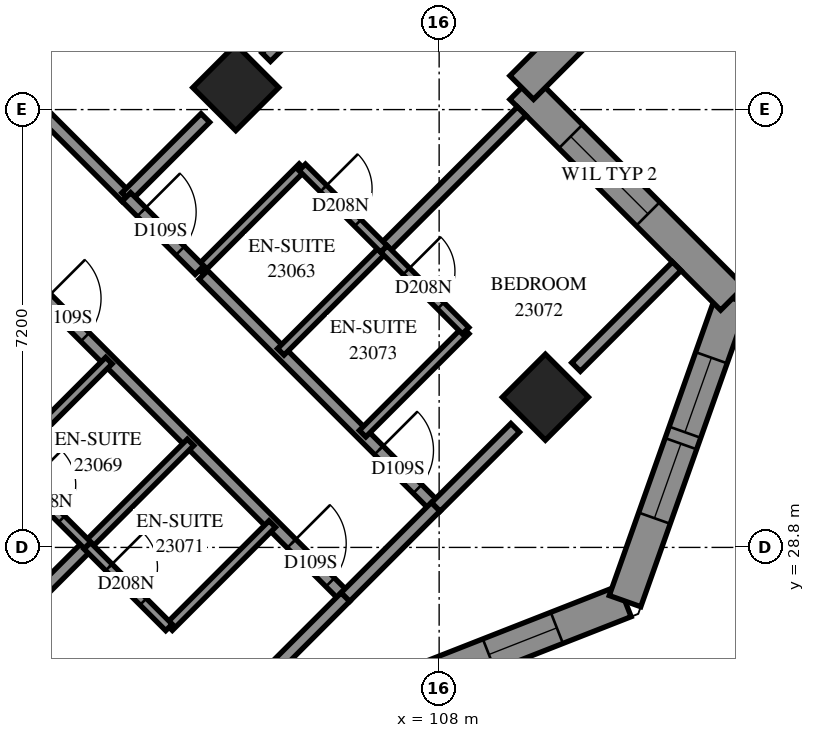
"""IFC4 building model, lengths in metres.
Left out: names, types, materials, properties, quantities, classifications, styles, units other than length and angle.
Written with IfcOpenShell. Run it as: python <this file> out.ifc"""

import sys

from ifc_helpers import new_model, si_unit, direction, frame, frame_2d, origin, origin_2d, place, context, subcontext, project, spatial, polyline, rectangle, outline, extrude, element, fill, save


model = new_model("IFC4")
c1 = context("Model", 3, precision=1e-05, world=origin(), true_north=direction((0.0, 1.0)))
c2 = subcontext(c1, "Body", "Model", "MODEL_VIEW")
j1 = project(units=[si_unit("LENGTHUNIT", "METRE"), si_unit("PLANEANGLEUNIT", "RADIAN")], contexts=[c1])
p1 = place(None, origin())
s1 = spatial("IfcSite", under=j1, at=p1, CompositionType="ELEMENT")
p2 = place(p1, origin())
s2 = spatial("IfcBuilding", under=s1, at=p2, CompositionType="ELEMENT")
p3 = place(p2, frame((0.0, 0.0, 88.0)))
s3 = spatial("IfcBuildingStorey", under=s2, at=p3, CompositionType="ELEMENT", Elevation=88.0)
for number, where, z_axis, x_axis in (
    (1, (104.656, 36.362, 0.0), (0.0, 0.0, 1.0), (0.707, -0.707, 0.0)),
    (2, (109.747, 31.271, 0.0), (0.0, 0.0, 1.0), (0.707, -0.707, 0.0)),
):
    element("IfcColumn", number, at=place(p3, frame(where, z_axis=z_axis, x_axis=x_axis)), inside=s3, PredefinedType="COLUMN", context=c2, shape_type="SweptSolid", body=[
        extrude(rectangle(XDim=1.0, YDim=1.0, at=origin_2d()), origin(), (0.0, 0.0, 1.0), 3.1),
    ])
p4 = place(p3, frame((105.942, 25.91, 0.0), z_axis=(0.0, 0.0, 1.0), x_axis=(0.9309314643, 0.3651939331, 0.0)))
e3 = element("IfcWall", 3, at=p4, inside=s3, PredefinedType="SOLIDWALL", context=c2, shape_type="SweptSolid", body=[
    extrude(outline(polyline([(0.12, -0.275), (5.62, -0.275), (5.369, 0.275), (-0.12, 0.275), (0.12, -0.275)])), origin(), (0.0, 0.0, 1.0), 3.1),
])
p5 = place(p4, frame((0.605, 0.0, 0.5)))
e4 = element("IfcOpeningElement", 4, at=p5, cuts=e3, PredefinedType="OPENING", context=c2, shape_type="SweptSolid", body=[
    extrude(rectangle(XDim=1.2, YDim=2.45, at=frame_2d((0.6, 1.225))), frame((0.0, 0.285, 0.0), z_axis=(0.0, -1.0, 0.0), x_axis=(1.0, 0.0, 0.0)), (0.0, 0.0, 1.0), 0.57),
])
p6 = place(p4, frame((3.089, 0.0, 0.5)))
e5 = element("IfcOpeningElement", 5, at=p6, cuts=e3, PredefinedType="OPENING", context=c2, shape_type="SweptSolid", body=[
    extrude(rectangle(XDim=1.2, YDim=2.45, at=frame_2d((0.6, 1.225))), frame((0.0, 0.285, 0.0), z_axis=(0.0, -1.0, 0.0), x_axis=(1.0, 0.0, 0.0)), (0.0, 0.0, 1.0), 0.57),
])
p7 = place(p3, frame((111.057, 27.917, 0.0), z_axis=(0.0, 0.0, 1.0), x_axis=(0.334430452, 0.9424204331, 0.0)))
e6 = element("IfcWall", 6, at=p7, inside=s3, PredefinedType="SOLIDWALL", context=c2, shape_type="SweptSolid", body=[
    extrude(outline(polyline([(-0.125, -0.275), (5.457, -0.275), (5.11, 0.275), (0.125, 0.275), (-0.125, -0.275)])), origin(), (0.0, 0.0, 1.0), 3.1),
])
p8 = place(p7, frame((1.447, 0.0, 0.5)))
e7 = element("IfcOpeningElement", 7, at=p8, cuts=e6, PredefinedType="OPENING", context=c2, shape_type="SweptSolid", body=[
    extrude(rectangle(XDim=1.3, YDim=2.45, at=frame_2d((0.65, 1.225))), frame((0.0, 0.285, 0.0), z_axis=(0.0, -1.0, 0.0), x_axis=(1.0, 0.0, 0.0)), (0.0, 0.0, 1.0), 0.57),
])
p9 = place(p7, frame((2.947, 0.0, 0.5)))
e8 = element("IfcOpeningElement", 8, at=p9, cuts=e6, PredefinedType="OPENING", context=c2, shape_type="SweptSolid", body=[
    extrude(rectangle(XDim=1.3, YDim=2.45, at=frame_2d((0.65, 1.225))), frame((0.0, 0.285, 0.0), z_axis=(0.0, -1.0, 0.0), x_axis=(1.0, 0.0, 0.0)), (0.0, 0.0, 1.0), 0.57),
])
p10 = place(p3, frame((112.824, 32.896, 0.0), z_axis=(0.0, 0.0, 1.0), x_axis=(-0.7071067812, 0.7071067812, 0.0)))
e9 = element("IfcWall", 9, at=p10, inside=s3, PredefinedType="SOLIDWALL", context=c2, shape_type="SweptSolid", body=[
    extrude(outline(polyline([(-0.174, -0.275), (4.626, -0.275), (5.176, 0.275), (0.174, 0.275), (-0.174, -0.275)])), origin(), (0.0, 0.0, 1.0), 3.1),
])
p11 = place(p10, frame((1.964, 0.0, 0.6)))
e10 = element("IfcOpeningElement", 10, at=p11, cuts=e9, PredefinedType="OPENING", context=c2, shape_type="SweptSolid", body=[
    extrude(rectangle(XDim=1.8, YDim=1.9, at=frame_2d((0.9, 0.95))), frame((0.0, 0.285, 0.0), z_axis=(0.0, -1.0, 0.0), x_axis=(1.0, 0.0, 0.0)), (0.0, 0.0, 1.0), 0.57),
])
p12 = place(p3, frame((109.358, 36.362, 0.0), z_axis=(0.0, 0.0, 1.0), x_axis=(0.7071067812, 0.7071067812, 0.0)))
e11 = element("IfcWall", 11, at=p12, inside=s3, PredefinedType="SOLIDWALL", context=c2, shape_type="SweptSolid", body=[
    extrude(outline(polyline([(0.275, -0.275), (6.036, -0.275), (5.309, 0.275), (-0.275, 0.275), (0.275, -0.275)])), origin(), (0.0, 0.0, 1.0), 3.1),
])
p13 = place(p12, frame((1.137, 0.0, 0.6)))
e12 = element("IfcOpeningElement", 12, at=p13, cuts=e11, PredefinedType="OPENING", context=c2, shape_type="SweptSolid", body=[
    extrude(rectangle(XDim=1.8, YDim=1.9, at=frame_2d((0.9, 0.95))), frame((0.0, 0.285, 0.0), z_axis=(0.0, -1.0, 0.0), x_axis=(1.0, 0.0, 0.0)), (0.0, 0.0, 1.0), 0.57),
])
p14 = place(p3, frame((96.509, 23.118, 0.0), z_axis=(0.0, 0.0, 1.0), x_axis=(0.7069829425, 0.7072305982, 0.0)))
e13 = element("IfcWall", 13, at=p14, inside=s3, PredefinedType="PARTITIONING", context=c2, shape_type="SweptSolid", body=[
    extrude(rectangle(XDim=8.076, YDim=0.2, at=frame_2d((4.038, 0.0))), origin(), (0.0, 0.0, 1.0), 3.1),
])
p15 = place(p3, frame((101.365, 33.071, 0.0), z_axis=(0.0, 0.0, 1.0), x_axis=(0.7071067812, -0.7071067812, 0.0)))
e14 = element("IfcWall", 14, at=p15, inside=s3, PredefinedType="PARTITIONING", context=c2, shape_type="SweptSolid", body=[
    extrude(rectangle(XDim=7.2, YDim=0.2, at=frame_2d((3.6, 0.0))), origin(), (0.0, 0.0, 1.0), 3.1),
])
p16 = place(p15, frame((0.248, 0.0, 0.0)))
e15 = element("IfcOpeningElement", 15, at=p16, cuts=e14, PredefinedType="OPENING", context=c2, shape_type="SweptSolid", body=[
    extrude(rectangle(XDim=0.9, YDim=2.1, at=frame_2d((0.45, 1.05))), frame((0.0, 0.11, 0.0), z_axis=(0.0, -1.0, 0.0), x_axis=(1.0, 0.0, 0.0)), (0.0, 0.0, 1.0), 0.22),
])
p17 = place(p15, frame((5.95, 0.0, 0.0)))
e16 = element("IfcOpeningElement", 16, at=p17, cuts=e14, PredefinedType="OPENING", context=c2, shape_type="SweptSolid", body=[
    extrude(rectangle(XDim=0.9, YDim=2.1, at=frame_2d((0.45, 1.05))), frame((0.0, 0.11, 0.0), z_axis=(0.0, -1.0, 0.0), x_axis=(1.0, 0.0, 0.0)), (0.0, 0.0, 1.0), 0.22),
])
p18 = place(p3, frame((105.155, 36.863, 0.0), z_axis=(0.0, 0.0, 1.0), x_axis=(0.7071067812, 0.7071067812, 0.0)))
e17 = element("IfcWall", 17, at=p18, inside=s3, PredefinedType="PARTITIONING", context=c2, shape_type="SweptSolid", body=[
    extrude(rectangle(XDim=5.787, YDim=0.2, at=frame_2d((2.893, 0.0))), origin(), (0.0, 0.0, 1.0), 3.1),
])
p19 = place(p3, frame((104.123, 33.282, 0.0), z_axis=(0.0, 0.0, 1.0), x_axis=(0.7071067812, -0.7071067812, 0.0)))
e18 = element("IfcWall", 18, at=p19, inside=s3, PredefinedType="PARTITIONING", context=c2, shape_type="SweptSolid", body=[
    extrude(rectangle(XDim=5.399, YDim=0.2, at=frame_2d((2.7, 0.0))), origin(), (0.0, 0.0, 1.0), 3.1),
])
p20 = place(p19, frame((4.08, 0.0, 0.0)))
e19 = element("IfcOpeningElement", 19, at=p20, cuts=e18, PredefinedType="OPENING", context=c2, shape_type="SweptSolid", body=[
    extrude(rectangle(XDim=0.9, YDim=2.1, at=frame_2d((0.45, 1.05))), frame((0.0, 0.11, 0.0), z_axis=(0.0, -1.0, 0.0), x_axis=(1.0, 0.0, 0.0)), (0.0, 0.0, 1.0), 0.22),
])
p21 = place(p3, frame((100.31, 37.106, 0.0), z_axis=(0.0, 0.0, 1.0), x_axis=(0.7073845681, -0.7068288851, 0.0)))
e20 = element("IfcWall", 20, at=p21, inside=s3, PredefinedType="PARTITIONING", context=c2, shape_type="SweptSolid", body=[
    extrude(rectangle(XDim=3.599, YDim=0.2, at=frame_2d((1.8, 0.0))), origin(), (0.0, 0.0, 1.0), 3.1),
])
p22 = place(p3, frame((107.095, 33.711, 0.0), z_axis=(0.0, 0.0, 1.0), x_axis=(0.7071067812, 0.7071067812, 0.0)))
e21 = element("IfcWall", 21, at=p22, inside=s3, PredefinedType="PARTITIONING", context=c2, shape_type="SweptSolid", body=[
    extrude(rectangle(XDim=3.2, YDim=0.2, at=frame_2d((1.6, 0.0))), origin(), (0.0, 0.0, 1.0), 3.1),
])
p23 = place(p3, frame((100.871, 30.175, 0.0), z_axis=(0.0, 0.0, 1.0), x_axis=(0.7071067812, 0.7071067812, 0.0)))
e22 = element("IfcWall", 22, at=p23, inside=s3, PredefinedType="PARTITIONING", context=c2, shape_type="SweptSolid", body=[
    extrude(rectangle(XDim=2.401, YDim=0.15, at=frame_2d((1.201, 0.0))), origin(), (0.0, 0.0, 1.0), 3.1),
])
p24 = place(p3, frame((105.396, 32.016, 0.0), z_axis=(0.0, 0.0, 1.0), x_axis=(0.7075233388, 0.706689978, 0.0)))
e23 = element("IfcWall", 23, at=p24, inside=s3, PredefinedType="PARTITIONING", context=c2, shape_type="SweptSolid", body=[
    extrude(rectangle(XDim=2.4, YDim=0.15, at=frame_2d((1.2, 0.0))), origin(), (0.0, 0.0, 1.0), 3.1),
])
for number, where, z_axis, x_axis in (
    (24, (102.216, 28.832, 0.0), (0.0, 0.0, 1.0), (0.707, 0.707, 0.0)),
    (25, (104.055, 33.359, 0.0), (0.0, 0.0, 1.0), (0.707, 0.707, 0.0)),
    (26, (103.559, 27.489, 0.0), (0.0, 0.0, 1.0), (0.707, 0.707, 0.0)),
    (27, (106.741, 30.671, 0.0), (0.0, 0.0, 1.0), (0.707, 0.707, 0.0)),
):
    element("IfcWall", number, at=place(p3, frame(where, z_axis=z_axis, x_axis=x_axis)), inside=s3, PredefinedType="PARTITIONING", context=c2, shape_type="SweptSolid", body=[
        extrude(rectangle(XDim=2.398, YDim=0.15, at=frame_2d((1.199, 0.0))), origin(), (0.0, 0.0, 1.0), 3.1),
    ])
p25 = place(p3, frame((110.251, 31.767, 0.0), z_axis=(0.0, 0.0, 1.0), x_axis=(0.7066584143, 0.7075548639, 0.0)))
e28 = element("IfcWall", 28, at=p25, inside=s3, PredefinedType="PARTITIONING", context=c2, shape_type="SweptSolid", body=[
    extrude(rectangle(XDim=2.343, YDim=0.2, at=frame_2d((1.171, 0.0))), origin(), (0.0, 0.0, 1.0), 3.1),
])
p26 = place(p3, frame((106.457, 27.983, 0.0), z_axis=(0.0, 0.0, 1.0), x_axis=(0.7071067812, 0.7071067812, 0.0)))
e29 = element("IfcWall", 29, at=p26, inside=s3, PredefinedType="PARTITIONING", context=c2, shape_type="SweptSolid", body=[
    extrude(rectangle(XDim=2.102, YDim=0.2, at=frame_2d((1.051, 0.0))), origin(), (0.0, 0.0, 1.0), 2.6),
])
p27 = place(p3, frame((105.749, 35.051, 0.0), z_axis=(0.0, 0.0, 1.0), x_axis=(0.7071067812, -0.7071067812, 0.0)))
e30 = element("IfcWall", 30, at=p27, inside=s3, PredefinedType="PARTITIONING", context=c2, shape_type="SweptSolid", body=[
    extrude(rectangle(XDim=1.901, YDim=0.15, at=frame_2d((0.95, 0.0))), origin(), (0.0, 0.0, 1.0), 3.1),
])
p28 = place(p27, frame((0.493, 0.0, 0.0)))
e31 = element("IfcOpeningElement", 31, at=p28, cuts=e30, PredefinedType="OPENING", context=c2, shape_type="SweptSolid", body=[
    extrude(rectangle(XDim=0.8, YDim=2.1, at=frame_2d((0.4, 1.05))), frame((0.0, 0.085, 0.0), z_axis=(0.0, -1.0, 0.0), x_axis=(1.0, 0.0, 0.0)), (0.0, 0.0, 1.0), 0.17),
])
p29 = place(p3, frame((100.875, 30.177, 0.0), z_axis=(0.0, 0.0, 1.0), x_axis=(0.7076330979, -0.7065800724, 0.0)))
e32 = element("IfcWall", 32, at=p29, inside=s3, PredefinedType="PARTITIONING", context=c2, shape_type="SweptSolid", body=[
    extrude(rectangle(XDim=1.899, YDim=0.15, at=frame_2d((0.95, 0.0))), origin(), (0.0, 0.0, 1.0), 3.1),
])
p30 = place(p29, frame((0.493, 0.0, 0.0)))
e33 = element("IfcOpeningElement", 33, at=p30, cuts=e32, PredefinedType="OPENING", context=c2, shape_type="SweptSolid", body=[
    extrude(rectangle(XDim=0.8, YDim=2.1, at=frame_2d((0.4, 1.05))), frame((0.0, 0.085, 0.0), z_axis=(0.0, -1.0, 0.0), x_axis=(1.0, 0.0, 0.0)), (0.0, 0.0, 1.0), 0.17),
])
p31 = place(p3, frame((107.094, 33.708, 0.0), z_axis=(0.0, 0.0, 1.0), x_axis=(0.7065800724, -0.7076330979, 0.0)))
e34 = element("IfcWall", 34, at=p31, inside=s3, PredefinedType="PARTITIONING", context=c2, shape_type="SweptSolid", body=[
    extrude(rectangle(XDim=1.899, YDim=0.15, at=frame_2d((0.95, 0.0))), origin(), (0.0, 0.0, 1.0), 3.1),
])
p32 = place(p31, frame((0.519, 0.0, 0.0)))
e35 = element("IfcOpeningElement", 35, at=p32, cuts=e34, PredefinedType="OPENING", context=c2, shape_type="SweptSolid", body=[
    extrude(rectangle(XDim=0.8, YDim=2.1, at=frame_2d((0.4, 1.05))), frame((0.0, 0.085, 0.0), z_axis=(0.0, -1.0, 0.0), x_axis=(1.0, 0.0, 0.0)), (0.0, 0.0, 1.0), 0.17),
])
p33 = place(p3, frame((102.215, 28.826, 0.0), z_axis=(0.0, 0.0, 1.0), x_axis=(0.7071067812, -0.7071067812, 0.0)))
e36 = element("IfcWall", 36, at=p33, inside=s3, PredefinedType="PARTITIONING", context=c2, shape_type="SweptSolid", body=[
    extrude(rectangle(XDim=1.898, YDim=0.15, at=frame_2d((0.949, 0.0))), origin(), (0.0, 0.0, 1.0), 3.1),
])
p34 = place(p33, frame((0.5, 0.0, 0.0)))
e37 = element("IfcOpeningElement", 37, at=p34, cuts=e36, PredefinedType="OPENING", context=c2, shape_type="SweptSolid", body=[
    extrude(rectangle(XDim=0.8, YDim=2.1, at=frame_2d((0.4, 1.05))), frame((0.0, 0.085, 0.0), z_axis=(0.0, -1.0, 0.0), x_axis=(1.0, 0.0, 0.0)), (0.0, 0.0, 1.0), 0.17),
])
p35 = place(p3, frame((107.947, 29.465, 0.0), z_axis=(0.0, 0.0, 1.0), x_axis=(0.7076492487, 0.7065638971, 0.0)))
e38 = element("IfcWall", 38, at=p35, inside=s3, PredefinedType="PARTITIONING", context=c2, shape_type="SweptSolid", body=[
    extrude(rectangle(XDim=1.843, YDim=0.2, at=frame_2d((0.921, 0.0))), origin(), (0.0, 0.0, 1.0), 2.6),
])
p36 = place(p3, frame((102.853, 34.561, 0.0), z_axis=(0.0, 0.0, 1.0), x_axis=(0.7071067812, 0.7071067812, 0.0)))
e39 = element("IfcWall", 39, at=p36, inside=s3, PredefinedType="PARTITIONING", context=c2, shape_type="SweptSolid", body=[
    extrude(rectangle(XDim=1.841, YDim=0.2, at=frame_2d((0.921, 0.0))), origin(), (0.0, 0.0, 1.0), 3.1),
])
p37 = place(p3, frame((105.155, 26.681, 0.0), z_axis=(0.0, 0.0, 1.0), x_axis=(0.7071067812, 0.7071067812, 0.0)))
e40 = element("IfcWall", 40, at=p37, inside=s3, PredefinedType="PARTITIONING", context=c2, shape_type="SweptSolid", body=[
    extrude(rectangle(XDim=1.841, YDim=0.2, at=frame_2d((0.921, 0.0))), origin(), (0.0, 0.0, 1.0), 2.6),
])
p38 = place(p3, frame((102.857, 34.563, 0.0), z_axis=(0.0, 0.0, 1.0), x_axis=(0.7071067812, -0.7071067812, 0.0)))
e41 = element("IfcWall", 41, at=p38, inside=s3, PredefinedType="PARTITIONING", context=c2, shape_type="SweptSolid", body=[
    extrude(rectangle(XDim=1.7, YDim=0.2, at=frame_2d((0.85, 0.0))), origin(), (0.0, 0.0, 1.0), 3.1),
])
p39 = place(p38, frame((0.35, 0.0, 0.0)))
e42 = element("IfcOpeningElement", 42, at=p39, cuts=e41, PredefinedType="OPENING", context=c2, shape_type="SweptSolid", body=[
    extrude(rectangle(XDim=0.9, YDim=2.1, at=frame_2d((0.45, 1.05))), frame((0.0, 0.11, 0.0), z_axis=(0.0, -1.0, 0.0), x_axis=(1.0, 0.0, 0.0)), (0.0, 0.0, 1.0), 0.22),
])
p40 = place(p6, origin())
e43 = element("IfcWindow", 43, at=p40, inside=s3, PartitioningType="SINGLE_PANEL", PredefinedType="WINDOW", context=c2, shape_type="SweptSolid", body=[
    extrude(rectangle(XDim=1.2, YDim=2.45, at=frame_2d((0.6, 1.225))), frame((0.0, 0.155, 0.0), z_axis=(0.0, -1.0, 0.0), x_axis=(1.0, 0.0, 0.0)), (0.0, 0.0, 1.0), 0.06),
])
fill(e5, e43)
p41 = place(p8, origin())
e44 = element("IfcWindow", 44, at=p41, inside=s3, PartitioningType="SINGLE_PANEL", PredefinedType="WINDOW", context=c2, shape_type="SweptSolid", body=[
    extrude(rectangle(XDim=1.3, YDim=2.45, at=frame_2d((0.65, 1.225))), frame((0.0, 0.155, 0.0), z_axis=(0.0, -1.0, 0.0), x_axis=(1.0, 0.0, 0.0)), (0.0, 0.0, 1.0), 0.06),
])
fill(e7, e44)
p42 = place(p9, origin())
e45 = element("IfcWindow", 45, at=p42, inside=s3, PartitioningType="SINGLE_PANEL", PredefinedType="WINDOW", context=c2, shape_type="SweptSolid", body=[
    extrude(rectangle(XDim=1.3, YDim=2.45, at=frame_2d((0.65, 1.225))), frame((0.0, 0.155, 0.0), z_axis=(0.0, -1.0, 0.0), x_axis=(1.0, 0.0, 0.0)), (0.0, 0.0, 1.0), 0.06),
])
fill(e8, e45)
p43 = place(p11, origin())
e46 = element("IfcWindow", 46, at=p43, inside=s3, PartitioningType="SINGLE_PANEL", PredefinedType="WINDOW", context=c2, shape_type="SweptSolid", body=[
    extrude(rectangle(XDim=1.8, YDim=1.9, at=frame_2d((0.9, 0.95))), frame((0.0, 0.155, 0.0), z_axis=(0.0, -1.0, 0.0), x_axis=(1.0, 0.0, 0.0)), (0.0, 0.0, 1.0), 0.06),
])
fill(e10, e46)
p44 = place(p39, origin())
e47 = element("IfcDoor", 47, at=p44, inside=s3, OperationType="SINGLE_SWING_LEFT", PredefinedType="DOOR", context=c2, shape_type="SweptSolid", body=[
    extrude(rectangle(XDim=0.9, YDim=2.1, at=frame_2d((0.45, 1.05))), frame((0.0, 0.025, 0.0), z_axis=(0.0, -1.0, 0.0), x_axis=(1.0, 0.0, 0.0)), (0.0, 0.0, 1.0), 0.05),
])
fill(e42, e47)
p45 = place(p28, origin())
e48 = element("IfcDoor", 48, at=p45, inside=s3, OperationType="SINGLE_SWING_RIGHT", PredefinedType="DOOR", context=c2, shape_type="SweptSolid", body=[
    extrude(rectangle(XDim=0.8, YDim=2.1, at=frame_2d((0.4, 1.05))), frame((0.0, 0.025, 0.0), z_axis=(0.0, -1.0, 0.0), x_axis=(1.0, 0.0, 0.0)), (0.0, 0.0, 1.0), 0.05),
])
fill(e31, e48)
p46 = place(p16, origin())
e49 = element("IfcDoor", 49, at=p46, inside=s3, OperationType="SINGLE_SWING_RIGHT", PredefinedType="DOOR", context=c2, shape_type="SweptSolid", body=[
    extrude(rectangle(XDim=0.9, YDim=2.1, at=frame_2d((0.45, 1.05))), frame((0.0, 0.025, 0.0), z_axis=(0.0, -1.0, 0.0), x_axis=(1.0, 0.0, 0.0)), (0.0, 0.0, 1.0), 0.05),
])
fill(e15, e49)
p47 = place(p30, origin())
e50 = element("IfcDoor", 50, at=p47, inside=s3, OperationType="SINGLE_SWING_RIGHT", PredefinedType="DOOR", context=c2, shape_type="SweptSolid", body=[
    extrude(rectangle(XDim=0.8, YDim=2.1, at=frame_2d((0.4, 1.05))), frame((0.0, 0.025, 0.0), z_axis=(0.0, -1.0, 0.0), x_axis=(1.0, 0.0, 0.0)), (0.0, 0.0, 1.0), 0.05),
])
fill(e33, e50)
p48 = place(p17, origin())
e51 = element("IfcDoor", 51, at=p48, inside=s3, OperationType="SINGLE_SWING_LEFT", PredefinedType="DOOR", context=c2, shape_type="SweptSolid", body=[
    extrude(rectangle(XDim=0.9, YDim=2.1, at=frame_2d((0.45, 1.05))), frame((0.0, 0.025, 0.0), z_axis=(0.0, -1.0, 0.0), x_axis=(1.0, 0.0, 0.0)), (0.0, 0.0, 1.0), 0.05),
])
fill(e16, e51)
p49 = place(p34, origin())
e52 = element("IfcDoor", 52, at=p49, inside=s3, OperationType="SINGLE_SWING_RIGHT", PredefinedType="DOOR", context=c2, shape_type="SweptSolid", body=[
    extrude(rectangle(XDim=0.8, YDim=2.1, at=frame_2d((0.4, 1.05))), frame((0.0, 0.025, 0.0), z_axis=(0.0, -1.0, 0.0), x_axis=(1.0, 0.0, 0.0)), (0.0, 0.0, 1.0), 0.05),
])
fill(e37, e52)
p50 = place(p20, origin())
e53 = element("IfcDoor", 53, at=p50, inside=s3, OperationType="SINGLE_SWING_RIGHT", PredefinedType="DOOR", context=c2, shape_type="SweptSolid", body=[
    extrude(rectangle(XDim=0.9, YDim=2.1, at=frame_2d((0.45, 1.05))), frame((0.0, 0.025, 0.0), z_axis=(0.0, -1.0, 0.0), x_axis=(1.0, 0.0, 0.0)), (0.0, 0.0, 1.0), 0.05),
])
fill(e19, e53)
p51 = place(p32, origin())
e54 = element("IfcDoor", 54, at=p51, inside=s3, OperationType="SINGLE_SWING_RIGHT", PredefinedType="DOOR", context=c2, shape_type="SweptSolid", body=[
    extrude(rectangle(XDim=0.8, YDim=2.1, at=frame_2d((0.4, 1.05))), frame((0.0, 0.025, 0.0), z_axis=(0.0, -1.0, 0.0), x_axis=(1.0, 0.0, 0.0)), (0.0, 0.0, 1.0), 0.05),
])
fill(e35, e54)
save(model, sys.argv[1])
